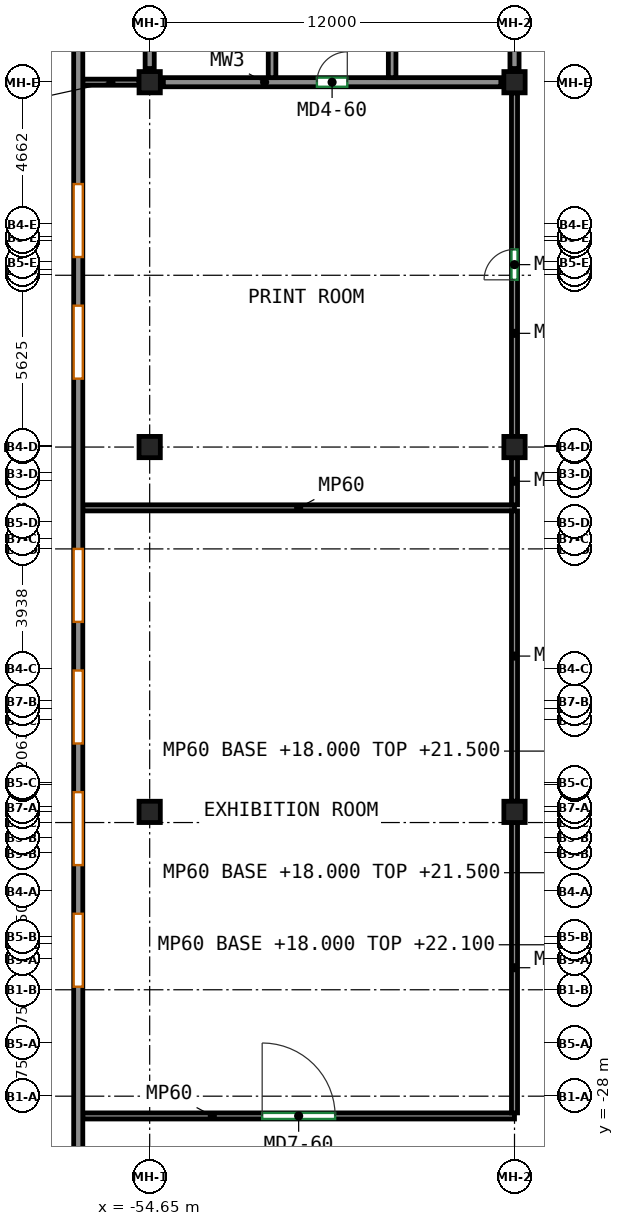
"""IFC4 building model, lengths in metres.
Left out: names, types, materials, properties, quantities, classifications, styles, units other than length and angle.
Written with IfcOpenShell. Run it as: python <this file> out.ifc"""

import sys

from ifc_helpers import new_model, si_unit, direction, frame, frame_2d, origin, origin_2d, place, context, subcontext, project, spatial, rectangle, extrude, source, transform, mapped, element, fill, save


model = new_model("IFC4")
c1 = context("Model", 3, precision=1e-05, world=origin(), true_north=direction((0.0, 1.0)))
c2 = subcontext(c1, "Body", "Model", "MODEL_VIEW")
j1 = project(units=[si_unit("LENGTHUNIT", "METRE"), si_unit("PLANEANGLEUNIT", "RADIAN")], contexts=[c1])
p1 = place(None, origin())
s1 = spatial("IfcSite", under=j1, at=p1, CompositionType="ELEMENT")
p2 = place(p1, origin())
s2 = spatial("IfcBuilding", under=s1, at=p2, CompositionType="ELEMENT")
p3 = place(p2, frame((0.0, 0.0, 18.0)))
s3 = spatial("IfcBuildingStorey", under=s2, at=p3, CompositionType="ELEMENT", Elevation=18.0)
m1 = source(origin(), c2, "Body", "SweptSolid", [
    extrude(rectangle(XDim=0.7, YDim=0.7, at=origin_2d()), origin(), (0.0, 0.0, 1.0), 4.1),
])
for number, where, z_axis, x_axis in (
    (1, (-54.65, -18.65, 0.0), (0.0, 0.0, 1.0), (1.0, 0.0, 0.0)),
    (2, (-54.65, -6.65, 0.0), (0.0, 0.0, 1.0), (1.0, 0.0, 0.0)),
    (3, (-54.65, 5.35, 0.0), (0.0, 0.0, 1.0), (1.0, 0.0, 0.0)),
    (4, (-42.65, -18.65, 0.0), (0.0, 0.0, 1.0), (1.0, 0.0, 0.0)),
    (5, (-42.65, -6.65, 0.0), (0.0, 0.0, 1.0), (1.0, 0.0, 0.0)),
    (6, (-42.65, 5.35, 0.0), (0.0, 0.0, 1.0), (1.0, 0.0, 0.0)),
):
    element("IfcColumn", number, at=place(p3, frame(where, z_axis=z_axis, x_axis=x_axis)), inside=s3, PredefinedType="COLUMN", context=c2, shape_type="MappedRepresentation", body=[
        mapped(m1, transform((0.0, 0.0, 0.0))),
    ])
m2 = source(origin(), c2, "Body", "SweptSolid", [
    extrude(rectangle(XDim=11.1, YDim=0.3, at=frame_2d((5.55, 0.0))), origin(), (0.0, 0.0, 1.0), 3.3),
])
p4 = place(p3, frame((-54.2, 5.35, 0.0), z_axis=(0.0, 0.0, 1.0), x_axis=(1.0, 0.0, 0.0)))
e7 = element("IfcWall", 7, at=p4, inside=s3, PredefinedType="SHEAR", context=c2, shape_type="MappedRepresentation", body=[
    mapped(m2, transform((0.0, 0.0, 0.0))),
])
p5 = place(p4, frame((5.05, 0.0, 0.0)))
e8 = element("IfcOpeningElement", 8, at=p5, cuts=e7, PredefinedType="OPENING", context=c2, shape_type="SweptSolid", body=[
    extrude(rectangle(XDim=1.0, YDim=2.1, at=frame_2d((0.5, 1.05))), frame((0.0, 0.16, 0.0), z_axis=(0.0, -1.0, 0.0), x_axis=(1.0, 0.0, 0.0)), (0.0, 0.0, 1.0), 0.32),
])
for number, where, z_axis, x_axis in (
    (9, (-54.65, 5.8, 0.0), (0.0, 0.0, 1.0), (0.0, 1.0, 0.0)),
    (10, (-42.65, 5.8, 0.0), (0.0, 0.0, 1.0), (0.0, 1.0, 0.0)),
):
    element("IfcWall", number, at=place(p3, frame(where, z_axis=z_axis, x_axis=x_axis)), inside=s3, PredefinedType="SHEAR", context=c2, shape_type="MappedRepresentation", body=[
        mapped(m2, transform((0.0, 0.0, 0.0))),
    ])
m3 = source(origin(), c2, "Body", "SweptSolid", [
    extrude(rectangle(XDim=9.85, YDim=0.25, at=frame_2d((4.925, 0.0))), origin(), (0.0, 0.0, 1.0), 4.1),
])
for number, where, z_axis, x_axis in (
    (11, (-50.625, 5.5, 0.0), (0.0, 0.0, 1.0), (0.0, 1.0, 0.0)),
    (12, (-46.675, 5.5, 0.0), (0.0, 0.0, 1.0), (0.0, 1.0, 0.0)),
):
    element("IfcWall", number, at=place(p3, frame(where, z_axis=z_axis, x_axis=x_axis)), inside=s3, PredefinedType="SHEAR", context=c2, shape_type="MappedRepresentation", body=[
        mapped(m3, transform((0.0, 0.0, 0.0))),
    ])
m4 = source(origin(), c2, "Body", "SweptSolid", [
    extrude(rectangle(XDim=100.7, YDim=0.3, at=frame_2d((50.35, 0.0))), origin(), (0.0, 0.0, 1.0), 4.1),
])
p6 = place(p3, frame((-57.0, -43.55, 0.0), z_axis=(0.0, 0.0, 1.0), x_axis=(0.0, 1.0, 0.0)))
e13 = element("IfcWall", 13, at=p6, inside=s3, PredefinedType="SOLIDWALL", context=c2, shape_type="MappedRepresentation", body=[
    mapped(m4, transform((0.0, 0.0, 0.0))),
])
p7 = place(p6, frame((3.15, 0.0, 0.9)))
e14 = element("IfcOpeningElement", 14, at=p7, cuts=e13, PredefinedType="OPENING", context=c2, shape_type="SweptSolid", body=[
    extrude(rectangle(XDim=2.4, YDim=1.8, at=frame_2d((1.2, 0.9))), frame((0.0, 0.16, 0.0), z_axis=(0.0, -1.0, 0.0), x_axis=(1.0, 0.0, 0.0)), (0.0, 0.0, 1.0), 0.32),
])
p8 = place(p6, frame((7.15, 0.0, 0.9)))
e15 = element("IfcOpeningElement", 15, at=p8, cuts=e13, PredefinedType="OPENING", context=c2, shape_type="SweptSolid", body=[
    extrude(rectangle(XDim=2.4, YDim=1.8, at=frame_2d((1.2, 0.9))), frame((0.0, 0.16, 0.0), z_axis=(0.0, -1.0, 0.0), x_axis=(1.0, 0.0, 0.0)), (0.0, 0.0, 1.0), 0.32),
])
p9 = place(p6, frame((11.15, 0.0, 0.9)))
e16 = element("IfcOpeningElement", 16, at=p9, cuts=e13, PredefinedType="OPENING", context=c2, shape_type="SweptSolid", body=[
    extrude(rectangle(XDim=2.4, YDim=1.8, at=frame_2d((1.2, 0.9))), frame((0.0, 0.16, 0.0), z_axis=(0.0, -1.0, 0.0), x_axis=(1.0, 0.0, 0.0)), (0.0, 0.0, 1.0), 0.32),
])
p10 = place(p6, frame((19.15, 0.0, 0.9)))
e17 = element("IfcOpeningElement", 17, at=p10, cuts=e13, PredefinedType="OPENING", context=c2, shape_type="SweptSolid", body=[
    extrude(rectangle(XDim=2.4, YDim=1.8, at=frame_2d((1.2, 0.9))), frame((0.0, 0.16, 0.0), z_axis=(0.0, -1.0, 0.0), x_axis=(1.0, 0.0, 0.0)), (0.0, 0.0, 1.0), 0.32),
])
p11 = place(p6, frame((23.15, 0.0, 0.9)))
e18 = element("IfcOpeningElement", 18, at=p11, cuts=e13, PredefinedType="OPENING", context=c2, shape_type="SweptSolid", body=[
    extrude(rectangle(XDim=2.4, YDim=1.8, at=frame_2d((1.2, 0.9))), frame((0.0, 0.16, 0.0), z_axis=(0.0, -1.0, 0.0), x_axis=(1.0, 0.0, 0.0)), (0.0, 0.0, 1.0), 0.32),
])
p12 = place(p6, frame((27.15, 0.0, 0.9)))
e19 = element("IfcOpeningElement", 19, at=p12, cuts=e13, PredefinedType="OPENING", context=c2, shape_type="SweptSolid", body=[
    extrude(rectangle(XDim=2.4, YDim=1.8, at=frame_2d((1.2, 0.9))), frame((0.0, 0.16, 0.0), z_axis=(0.0, -1.0, 0.0), x_axis=(1.0, 0.0, 0.0)), (0.0, 0.0, 1.0), 0.32),
])
p13 = place(p6, frame((31.15, 0.0, 0.9)))
e20 = element("IfcOpeningElement", 20, at=p13, cuts=e13, PredefinedType="OPENING", context=c2, shape_type="SweptSolid", body=[
    extrude(rectangle(XDim=2.4, YDim=1.8, at=frame_2d((1.2, 0.9))), frame((0.0, 0.16, 0.0), z_axis=(0.0, -1.0, 0.0), x_axis=(1.0, 0.0, 0.0)), (0.0, 0.0, 1.0), 0.32),
])
p14 = place(p6, frame((39.15, 0.0, 0.9)))
e21 = element("IfcOpeningElement", 21, at=p14, cuts=e13, PredefinedType="OPENING", context=c2, shape_type="SweptSolid", body=[
    extrude(rectangle(XDim=2.4, YDim=1.8, at=frame_2d((1.2, 0.9))), frame((0.0, 0.16, 0.0), z_axis=(0.0, -1.0, 0.0), x_axis=(1.0, 0.0, 0.0)), (0.0, 0.0, 1.0), 0.32),
])
p15 = place(p6, frame((43.15, 0.0, 0.9)))
e22 = element("IfcOpeningElement", 22, at=p15, cuts=e13, PredefinedType="OPENING", context=c2, shape_type="SweptSolid", body=[
    extrude(rectangle(XDim=2.4, YDim=1.8, at=frame_2d((1.2, 0.9))), frame((0.0, 0.16, 0.0), z_axis=(0.0, -1.0, 0.0), x_axis=(1.0, 0.0, 0.0)), (0.0, 0.0, 1.0), 0.32),
])
p16 = place(p6, frame((51.15, 0.0, 0.9)))
e23 = element("IfcOpeningElement", 23, at=p16, cuts=e13, PredefinedType="OPENING", context=c2, shape_type="SweptSolid", body=[
    extrude(rectangle(XDim=2.4, YDim=1.8, at=frame_2d((1.2, 0.9))), frame((0.0, 0.16, 0.0), z_axis=(0.0, -1.0, 0.0), x_axis=(1.0, 0.0, 0.0)), (0.0, 0.0, 1.0), 0.32),
])
p17 = place(p6, frame((55.15, 0.0, 0.9)))
e24 = element("IfcOpeningElement", 24, at=p17, cuts=e13, PredefinedType="OPENING", context=c2, shape_type="SweptSolid", body=[
    extrude(rectangle(XDim=2.4, YDim=1.8, at=frame_2d((1.2, 0.9))), frame((0.0, 0.16, 0.0), z_axis=(0.0, -1.0, 0.0), x_axis=(1.0, 0.0, 0.0)), (0.0, 0.0, 1.0), 0.32),
])
p18 = place(p6, frame((59.15, 0.0, 0.9)))
e25 = element("IfcOpeningElement", 25, at=p18, cuts=e13, PredefinedType="OPENING", context=c2, shape_type="SweptSolid", body=[
    extrude(rectangle(XDim=2.4, YDim=1.8, at=frame_2d((1.2, 0.9))), frame((0.0, 0.16, 0.0), z_axis=(0.0, -1.0, 0.0), x_axis=(1.0, 0.0, 0.0)), (0.0, 0.0, 1.0), 0.32),
])
p19 = place(p6, frame((63.15, 0.0, 0.9)))
e26 = element("IfcOpeningElement", 26, at=p19, cuts=e13, PredefinedType="OPENING", context=c2, shape_type="SweptSolid", body=[
    extrude(rectangle(XDim=2.4, YDim=1.8, at=frame_2d((1.2, 0.9))), frame((0.0, 0.16, 0.0), z_axis=(0.0, -1.0, 0.0), x_axis=(1.0, 0.0, 0.0)), (0.0, 0.0, 1.0), 0.32),
])
p20 = place(p6, frame((67.15, 0.0, 0.9)))
e27 = element("IfcOpeningElement", 27, at=p20, cuts=e13, PredefinedType="OPENING", context=c2, shape_type="SweptSolid", body=[
    extrude(rectangle(XDim=2.4, YDim=1.8, at=frame_2d((1.2, 0.9))), frame((0.0, 0.16, 0.0), z_axis=(0.0, -1.0, 0.0), x_axis=(1.0, 0.0, 0.0)), (0.0, 0.0, 1.0), 0.32),
])
p21 = place(p6, frame((75.15, 0.0, 0.9)))
e28 = element("IfcOpeningElement", 28, at=p21, cuts=e13, PredefinedType="OPENING", context=c2, shape_type="SweptSolid", body=[
    extrude(rectangle(XDim=2.4, YDim=1.8, at=frame_2d((1.2, 0.9))), frame((0.0, 0.16, 0.0), z_axis=(0.0, -1.0, 0.0), x_axis=(1.0, 0.0, 0.0)), (0.0, 0.0, 1.0), 0.32),
])
p22 = place(p6, frame((79.15, 0.0, 0.9)))
e29 = element("IfcOpeningElement", 29, at=p22, cuts=e13, PredefinedType="OPENING", context=c2, shape_type="SweptSolid", body=[
    extrude(rectangle(XDim=2.4, YDim=1.8, at=frame_2d((1.2, 0.9))), frame((0.0, 0.16, 0.0), z_axis=(0.0, -1.0, 0.0), x_axis=(1.0, 0.0, 0.0)), (0.0, 0.0, 1.0), 0.32),
])
p23 = place(p6, frame((83.15, 0.0, 0.9)))
e30 = element("IfcOpeningElement", 30, at=p23, cuts=e13, PredefinedType="OPENING", context=c2, shape_type="SweptSolid", body=[
    extrude(rectangle(XDim=2.4, YDim=1.8, at=frame_2d((1.2, 0.9))), frame((0.0, 0.16, 0.0), z_axis=(0.0, -1.0, 0.0), x_axis=(1.0, 0.0, 0.0)), (0.0, 0.0, 1.0), 0.32),
])
p24 = place(p6, frame((87.15, 0.0, 0.9)))
e31 = element("IfcOpeningElement", 31, at=p24, cuts=e13, PredefinedType="OPENING", context=c2, shape_type="SweptSolid", body=[
    extrude(rectangle(XDim=2.4, YDim=1.8, at=frame_2d((1.2, 0.9))), frame((0.0, 0.16, 0.0), z_axis=(0.0, -1.0, 0.0), x_axis=(1.0, 0.0, 0.0)), (0.0, 0.0, 1.0), 0.32),
])
p25 = place(p6, frame((91.15, 0.0, 0.9)))
e32 = element("IfcOpeningElement", 32, at=p25, cuts=e13, PredefinedType="OPENING", context=c2, shape_type="SweptSolid", body=[
    extrude(rectangle(XDim=2.4, YDim=1.8, at=frame_2d((1.2, 0.9))), frame((0.0, 0.16, 0.0), z_axis=(0.0, -1.0, 0.0), x_axis=(1.0, 0.0, 0.0)), (0.0, 0.0, 1.0), 0.32),
])
p26 = place(p6, frame((95.15, 0.0, 0.9)))
e33 = element("IfcOpeningElement", 33, at=p26, cuts=e13, PredefinedType="OPENING", context=c2, shape_type="SweptSolid", body=[
    extrude(rectangle(XDim=2.4, YDim=1.8, at=frame_2d((1.2, 0.9))), frame((0.0, 0.16, 0.0), z_axis=(0.0, -1.0, 0.0), x_axis=(1.0, 0.0, 0.0)), (0.0, 0.0, 1.0), 0.32),
])
m5 = source(origin(), c2, "Body", "SweptSolid", [
    extrude(rectangle(XDim=14.2, YDim=0.2, at=frame_2d((7.1, 0.0))), origin(), (0.0, 0.0, 1.0), 3.3),
])
p27 = place(p3, frame((-56.85, -28.65, 0.0), z_axis=(0.0, 0.0, 1.0), x_axis=(1.0, 0.0, 0.0)))
e34 = element("IfcWall", 34, at=p27, inside=s3, PredefinedType="PARTITIONING", context=c2, shape_type="MappedRepresentation", body=[
    mapped(m5, transform((0.0, 0.0, 0.0))),
])
p28 = place(p27, frame((5.9, 0.0, 0.0)))
e35 = element("IfcOpeningElement", 35, at=p28, cuts=e34, PredefinedType="OPENING", context=c2, shape_type="SweptSolid", body=[
    extrude(rectangle(XDim=2.4, YDim=2.4, at=frame_2d((1.2, 1.2))), frame((0.0, 0.11, 0.0), z_axis=(0.0, -1.0, 0.0), x_axis=(1.0, 0.0, 0.0)), (0.0, 0.0, 1.0), 0.22),
])
p29 = place(p3, frame((-56.85, -8.65, 0.0), z_axis=(0.0, 0.0, 1.0), x_axis=(1.0, 0.0, 0.0)))
e36 = element("IfcWall", 36, at=p29, inside=s3, PredefinedType="PARTITIONING", context=c2, shape_type="MappedRepresentation", body=[
    mapped(m5, transform((0.0, 0.0, 0.0))),
])
m6 = source(origin(), c2, "Body", "SweptSolid", [
    extrude(rectangle(XDim=1.85, YDim=0.2, at=frame_2d((0.925, 0.0))), origin(), (0.0, 0.0, 1.0), 4.1),
])
p30 = place(p3, frame((-56.85, 5.35, 0.0), z_axis=(0.0, 0.0, 1.0), x_axis=(1.0, 0.0, 0.0)))
e37 = element("IfcWall", 37, at=p30, inside=s3, PredefinedType="PARTITIONING", context=c2, shape_type="MappedRepresentation", body=[
    mapped(m6, transform((0.0, 0.0, 0.0))),
])
m7 = source(origin(), c2, "Body", "SweptSolid", [
    extrude(rectangle(XDim=9.55, YDim=0.2, at=frame_2d((4.775, 0.0))), origin(), (0.0, 0.0, 1.0), 3.3),
])
for number, where, z_axis, x_axis in (
    (38, (-42.65, -28.55, 0.0), (0.0, 0.0, 1.0), (0.0, 1.0, 0.0)),
    (39, (-42.65, -18.3, 0.0), (0.0, 0.0, 1.0), (0.0, 1.0, 0.0)),
):
    element("IfcWall", number, at=place(p3, frame(where, z_axis=z_axis, x_axis=x_axis)), inside=s3, PredefinedType="PARTITIONING", context=c2, shape_type="MappedRepresentation", body=[
        mapped(m7, transform((0.0, 0.0, 0.0))),
    ])
m8 = source(origin(), c2, "Body", "SweptSolid", [
    extrude(rectangle(XDim=1.55, YDim=0.2, at=frame_2d((0.775, 0.0))), origin(), (0.0, 0.0, 1.0), 3.3),
])
p31 = place(p3, frame((-42.65, -8.55, 0.0), z_axis=(0.0, 0.0, 1.0), x_axis=(0.0, 1.0, 0.0)))
e40 = element("IfcWall", 40, at=p31, inside=s3, PredefinedType="PARTITIONING", context=c2, shape_type="MappedRepresentation", body=[
    mapped(m8, transform((0.0, 0.0, 0.0))),
])
m9 = source(origin(), c2, "Body", "SweptSolid", [
    extrude(rectangle(XDim=11.3, YDim=0.2, at=frame_2d((5.65, 0.0))), origin(), (0.0, 0.0, 1.0), 3.3),
])
p32 = place(p3, frame((-42.65, -6.3, 0.0), z_axis=(0.0, 0.0, 1.0), x_axis=(0.0, 1.0, 0.0)))
e41 = element("IfcWall", 41, at=p32, inside=s3, PredefinedType="PARTITIONING", context=c2, shape_type="MappedRepresentation", body=[
    mapped(m9, transform((0.0, 0.0, 0.0))),
])
p33 = place(p32, frame((5.15, 0.0, 0.0)))
e42 = element("IfcOpeningElement", 42, at=p33, cuts=e41, PredefinedType="OPENING", context=c2, shape_type="SweptSolid", body=[
    extrude(rectangle(XDim=1.0, YDim=2.1, at=frame_2d((0.5, 1.05))), frame((0.0, 0.11, 0.0), z_axis=(0.0, -1.0, 0.0), x_axis=(1.0, 0.0, 0.0)), (0.0, 0.0, 1.0), 0.22),
])
p34 = place(p10, origin())
e43 = element("IfcWindow", 43, at=p34, inside=s3, PartitioningType="SINGLE_PANEL", PredefinedType="WINDOW", context=c2, shape_type="SweptSolid", body=[
    extrude(rectangle(XDim=2.4, YDim=1.8, at=frame_2d((1.2, 0.9))), frame((0.0, 0.03, 0.0), z_axis=(0.0, -1.0, 0.0), x_axis=(1.0, 0.0, 0.0)), (0.0, 0.0, 1.0), 0.06),
])
fill(e17, e43)
p35 = place(p11, origin())
e44 = element("IfcWindow", 44, at=p35, inside=s3, PartitioningType="SINGLE_PANEL", PredefinedType="WINDOW", context=c2, shape_type="SweptSolid", body=[
    extrude(rectangle(XDim=2.4, YDim=1.8, at=frame_2d((1.2, 0.9))), frame((0.0, 0.03, 0.0), z_axis=(0.0, -1.0, 0.0), x_axis=(1.0, 0.0, 0.0)), (0.0, 0.0, 1.0), 0.06),
])
fill(e18, e44)
p36 = place(p12, origin())
e45 = element("IfcWindow", 45, at=p36, inside=s3, PartitioningType="SINGLE_PANEL", PredefinedType="WINDOW", context=c2, shape_type="SweptSolid", body=[
    extrude(rectangle(XDim=2.4, YDim=1.8, at=frame_2d((1.2, 0.9))), frame((0.0, 0.03, 0.0), z_axis=(0.0, -1.0, 0.0), x_axis=(1.0, 0.0, 0.0)), (0.0, 0.0, 1.0), 0.06),
])
fill(e19, e45)
p37 = place(p13, origin())
e46 = element("IfcWindow", 46, at=p37, inside=s3, PartitioningType="SINGLE_PANEL", PredefinedType="WINDOW", context=c2, shape_type="SweptSolid", body=[
    extrude(rectangle(XDim=2.4, YDim=1.8, at=frame_2d((1.2, 0.9))), frame((0.0, 0.03, 0.0), z_axis=(0.0, -1.0, 0.0), x_axis=(1.0, 0.0, 0.0)), (0.0, 0.0, 1.0), 0.06),
])
fill(e20, e46)
p38 = place(p14, origin())
e47 = element("IfcWindow", 47, at=p38, inside=s3, PartitioningType="SINGLE_PANEL", PredefinedType="WINDOW", context=c2, shape_type="SweptSolid", body=[
    extrude(rectangle(XDim=2.4, YDim=1.8, at=frame_2d((1.2, 0.9))), frame((0.0, 0.03, 0.0), z_axis=(0.0, -1.0, 0.0), x_axis=(1.0, 0.0, 0.0)), (0.0, 0.0, 1.0), 0.06),
])
fill(e21, e47)
p39 = place(p15, origin())
e48 = element("IfcWindow", 48, at=p39, inside=s3, PartitioningType="SINGLE_PANEL", PredefinedType="WINDOW", context=c2, shape_type="SweptSolid", body=[
    extrude(rectangle(XDim=2.4, YDim=1.8, at=frame_2d((1.2, 0.9))), frame((0.0, 0.03, 0.0), z_axis=(0.0, -1.0, 0.0), x_axis=(1.0, 0.0, 0.0)), (0.0, 0.0, 1.0), 0.06),
])
fill(e22, e48)
p40 = place(p5, origin())
e49 = element("IfcDoor", 49, at=p40, inside=s3, OperationType="SINGLE_SWING_RIGHT", PredefinedType="DOOR", context=c2, shape_type="SweptSolid", body=[
    extrude(rectangle(XDim=1.0, YDim=2.1, at=frame_2d((0.5, 1.05))), frame((0.0, 0.025, 0.0), z_axis=(0.0, -1.0, 0.0), x_axis=(1.0, 0.0, 0.0)), (0.0, 0.0, 1.0), 0.05),
])
fill(e8, e49)
p41 = place(p28, origin())
e50 = element("IfcDoor", 50, at=p41, inside=s3, OperationType="DOUBLE_DOOR_SINGLE_SWING", PredefinedType="DOOR", context=c2, shape_type="SweptSolid", body=[
    extrude(rectangle(XDim=2.4, YDim=2.4, at=frame_2d((1.2, 1.2))), frame((0.0, 0.025, 0.0), z_axis=(0.0, -1.0, 0.0), x_axis=(1.0, 0.0, 0.0)), (0.0, 0.0, 1.0), 0.05),
])
fill(e35, e50)
p42 = place(p33, origin())
e51 = element("IfcDoor", 51, at=p42, inside=s3, OperationType="SINGLE_SWING_LEFT", PredefinedType="DOOR", context=c2, shape_type="SweptSolid", body=[
    extrude(rectangle(XDim=1.0, YDim=2.1, at=frame_2d((0.5, 1.05))), frame((0.0, 0.025, 0.0), z_axis=(0.0, -1.0, 0.0), x_axis=(1.0, 0.0, 0.0)), (0.0, 0.0, 1.0), 0.05),
])
fill(e42, e51)
save(model, sys.argv[1])
